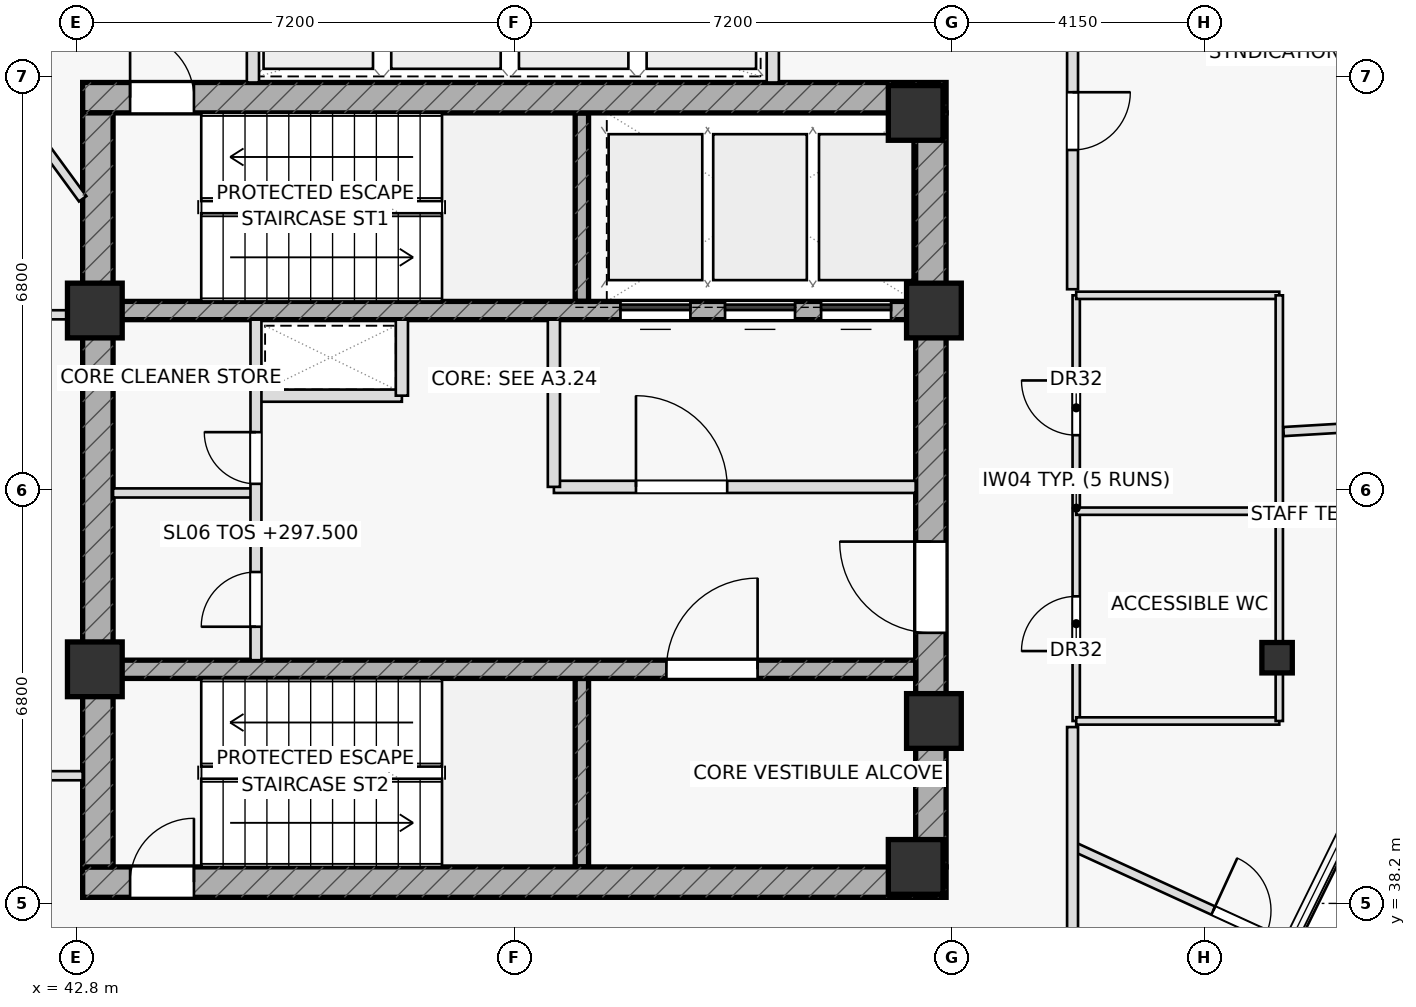
"""IFC4 building model, lengths in metres.
Left out: names, types, materials, properties, quantities, classifications, styles, units other than length and angle.
Written with IfcOpenShell. Run it as: python <this file> out.ifc"""

import sys

from ifc_helpers import new_model, si_unit, direction, frame, frame_2d, origin, origin_2d, place, context, subcontext, project, spatial, rectangle, hollow_rectangle, extrude, element, fill, save


model = new_model("IFC4")
c1 = context("Model", 3, precision=1e-05, world=origin(), true_north=direction((0.0, 1.0)))
c2 = subcontext(c1, "Body", "Model", "MODEL_VIEW")
j1 = project(units=[si_unit("LENGTHUNIT", "METRE"), si_unit("PLANEANGLEUNIT", "RADIAN")], contexts=[c1])
p1 = place(None, origin())
s1 = spatial("IfcSite", under=j1, at=p1, CompositionType="ELEMENT")
p2 = place(p1, origin())
s2 = spatial("IfcBuilding", under=s1, at=p2, CompositionType="ELEMENT")
p3 = place(p2, frame((0.0, 0.0, 297.5)))
s3 = spatial("IfcBuildingStorey", under=s2, at=p3, CompositionType="ELEMENT", Elevation=297.5)
for number, where, z_axis, x_axis in (
    (1, (51.11, 48.1, 0.0), (0.0, 0.0, 1.0), (0.0, 1.0, 0.0)),
    (2, (51.11, 38.8, 0.0), (0.0, 0.0, 1.0), (0.0, 1.0, 0.0)),
):
    element("IfcWall", number, at=place(p3, frame(where, z_axis=z_axis, x_axis=x_axis)), inside=s3, PredefinedType="SHEAR", context=c2, shape_type="SweptSolid", body=[
        extrude(rectangle(XDim=3.1, YDim=0.22, at=frame_2d((1.55, 0.0))), origin(), (0.0, 0.0, 1.0), 3.7),
    ])
p4 = place(p3, frame((42.9, 51.45, 0.0), z_axis=(0.0, 0.0, 1.0), x_axis=(1.0, 0.0, 0.0)))
e3 = element("IfcWall", 3, at=p4, inside=s3, PredefinedType="SHEAR", context=c2, shape_type="SweptSolid", body=[
    extrude(rectangle(XDim=14.2, YDim=0.5, at=frame_2d((7.1, 0.0))), origin(), (0.0, 0.0, 1.0), 3.7),
])
p5 = place(p4, frame((0.78, 0.0, 0.0)))
e4 = element("IfcOpeningElement", 4, at=p5, cuts=e3, PredefinedType="OPENING", context=c2, shape_type="SweptSolid", body=[
    extrude(rectangle(XDim=1.05, YDim=2.2, at=frame_2d((0.525, 1.1))), frame((0.0, 0.26, 0.0), z_axis=(0.0, -1.0, 0.0), x_axis=(1.0, 0.0, 0.0)), (0.0, 0.0, 1.0), 0.52),
])
p6 = place(p3, frame((42.9, 38.55, 0.0), z_axis=(0.0, 0.0, 1.0), x_axis=(1.0, 0.0, 0.0)))
e5 = element("IfcWall", 5, at=p6, inside=s3, PredefinedType="SHEAR", context=c2, shape_type="SweptSolid", body=[
    extrude(rectangle(XDim=14.2, YDim=0.5, at=frame_2d((7.1, 0.0))), origin(), (0.0, 0.0, 1.0), 3.7),
])
p7 = place(p6, frame((0.78, 0.0, 0.0)))
e6 = element("IfcOpeningElement", 6, at=p7, cuts=e5, PredefinedType="OPENING", context=c2, shape_type="SweptSolid", body=[
    extrude(rectangle(XDim=1.05, YDim=2.2, at=frame_2d((0.525, 1.1))), frame((0.0, 0.26, 0.0), z_axis=(0.0, -1.0, 0.0), x_axis=(1.0, 0.0, 0.0)), (0.0, 0.0, 1.0), 0.52),
])
p8 = place(p3, frame((43.15, 38.8, 0.0), z_axis=(0.0, 0.0, 1.0), x_axis=(0.0, 1.0, 0.0)))
e7 = element("IfcWall", 7, at=p8, inside=s3, PredefinedType="SHEAR", context=c2, shape_type="SweptSolid", body=[
    extrude(rectangle(XDim=12.4, YDim=0.5, at=frame_2d((6.2, 0.0))), origin(), (0.0, 0.0, 1.0), 3.7),
])
p9 = place(p3, frame((56.85, 38.8, 0.0), z_axis=(0.0, 0.0, 1.0), x_axis=(0.0, 1.0, 0.0)))
e8 = element("IfcWall", 8, at=p9, inside=s3, PredefinedType="SHEAR", context=c2, shape_type="SweptSolid", body=[
    extrude(rectangle(XDim=12.4, YDim=0.5, at=frame_2d((6.2, 0.0))), origin(), (0.0, 0.0, 1.0), 3.7),
])
p10 = place(p9, frame((3.85, 0.0, 0.0)))
e9 = element("IfcOpeningElement", 9, at=p10, cuts=e8, PredefinedType="OPENING", context=c2, shape_type="SweptSolid", body=[
    extrude(rectangle(XDim=1.5, YDim=2.2, at=frame_2d((0.75, 1.1))), frame((0.0, 0.26, 0.0), z_axis=(0.0, -1.0, 0.0), x_axis=(1.0, 0.0, 0.0)), (0.0, 0.0, 1.0), 0.52),
])
p11 = place(p3, frame((43.4, 47.95, 0.0), z_axis=(0.0, 0.0, 1.0), x_axis=(1.0, 0.0, 0.0)))
e10 = element("IfcWall", 10, at=p11, inside=s3, PredefinedType="SHEAR", context=c2, shape_type="SweptSolid", body=[
    extrude(rectangle(XDim=13.2, YDim=0.3, at=frame_2d((6.6, 0.0))), origin(), (0.0, 0.0, 1.0), 3.7),
])
p12 = place(p11, frame((8.345, 0.0, 0.0)))
e11 = element("IfcOpeningElement", 11, at=p12, cuts=e10, PredefinedType="OPENING", context=c2, shape_type="SweptSolid", body=[
    extrude(rectangle(XDim=1.15, YDim=2.2, at=frame_2d((0.575, 1.1))), frame((0.0, 0.16, 0.0), z_axis=(0.0, -1.0, 0.0), x_axis=(1.0, 0.0, 0.0)), (0.0, 0.0, 1.0), 0.32),
])
p13 = place(p11, frame((10.065, 0.0, 0.0)))
e12 = element("IfcOpeningElement", 12, at=p13, cuts=e10, PredefinedType="OPENING", context=c2, shape_type="SweptSolid", body=[
    extrude(rectangle(XDim=1.15, YDim=2.2, at=frame_2d((0.575, 1.1))), frame((0.0, 0.16, 0.0), z_axis=(0.0, -1.0, 0.0), x_axis=(1.0, 0.0, 0.0)), (0.0, 0.0, 1.0), 0.32),
])
p14 = place(p11, frame((11.645, 0.0, 0.0)))
e13 = element("IfcOpeningElement", 13, at=p14, cuts=e10, PredefinedType="OPENING", context=c2, shape_type="SweptSolid", body=[
    extrude(rectangle(XDim=1.15, YDim=2.2, at=frame_2d((0.575, 1.1))), frame((0.0, 0.16, 0.0), z_axis=(0.0, -1.0, 0.0), x_axis=(1.0, 0.0, 0.0)), (0.0, 0.0, 1.0), 0.32),
])
p15 = place(p3, frame((43.4, 42.05, 0.0), z_axis=(0.0, 0.0, 1.0), x_axis=(1.0, 0.0, 0.0)))
e14 = element("IfcWall", 14, at=p15, inside=s3, PredefinedType="SHEAR", context=c2, shape_type="SweptSolid", body=[
    extrude(rectangle(XDim=13.2, YDim=0.3, at=frame_2d((6.6, 0.0))), origin(), (0.0, 0.0, 1.0), 3.7),
])
p16 = place(p15, frame((9.1, 0.0, 0.0)))
e15 = element("IfcOpeningElement", 15, at=p16, cuts=e14, PredefinedType="OPENING", context=c2, shape_type="SweptSolid", body=[
    extrude(rectangle(XDim=1.5, YDim=2.2, at=frame_2d((0.75, 1.1))), frame((0.0, 0.16, 0.0), z_axis=(0.0, -1.0, 0.0), x_axis=(1.0, 0.0, 0.0)), (0.0, 0.0, 1.0), 0.32),
])
for number, where, z_axis, x_axis in (
    (16, (43.1, 47.95, 0.0), (0.0, 0.0, 1.0), (1.0, 0.0, 0.0)),
    (17, (56.9, 47.95, 0.0), (0.0, 0.0, 1.0), (1.0, 0.0, 0.0)),
    (18, (56.6, 51.2, 0.0), (0.0, 0.0, 1.0), (1.0, 0.0, 0.0)),
    (19, (43.1, 42.05, 0.0), (0.0, 0.0, 1.0), (1.0, 0.0, 0.0)),
    (20, (56.9, 41.2, 0.0), (0.0, 0.0, 1.0), (1.0, 0.0, 0.0)),
    (21, (56.6, 38.8, 0.0), (0.0, 0.0, 1.0), (1.0, 0.0, 0.0)),
):
    element("IfcColumn", number, at=place(p3, frame(where, z_axis=z_axis, x_axis=x_axis)), inside=s3, PredefinedType="COLUMN", context=c2, shape_type="SweptSolid", body=[
        extrude(rectangle(XDim=0.9, YDim=0.9, at=origin_2d()), origin(), (0.0, 0.0, 1.0), 3.7),
    ])
p17 = place(p3, frame((62.544, 42.24, 0.0), z_axis=(0.0, 0.0, 1.0), x_axis=(1.0, 0.0, 0.0)))
e22 = element("IfcColumn", 22, at=p17, inside=s3, PredefinedType="COLUMN", context=c2, shape_type="SweptSolid", body=[
    extrude(hollow_rectangle(XDim=0.5, YDim=0.5, WallThickness=0.03, at=origin_2d()), origin(), (0.0, 0.0, 1.0), 3.7),
])
for number, where, z_axis, x_axis in (
    (23, (45.7, 51.7, 0.0), (0.0, 0.0, 1.0), (0.0, 1.0, 0.0)),
    (24, (54.25, 51.7, 0.0), (0.0, 0.0, 1.0), (0.0, 1.0, 0.0)),
):
    element("IfcWall", number, at=place(p3, frame(where, z_axis=z_axis, x_axis=x_axis)), inside=s3, PredefinedType="PARTITIONING", context=c2, shape_type="SweptSolid", body=[
        extrude(rectangle(XDim=2.6, YDim=0.2, at=frame_2d((1.3, 0.0))), origin(), (0.0, 0.0, 1.0), 3.7),
    ])
p18 = place(p3, frame((45.75, 46.55, 0.0), z_axis=(0.0, 0.0, 1.0), x_axis=(1.0, 0.0, 0.0)))
e25 = element("IfcWall", 25, at=p18, inside=s3, PredefinedType="PARTITIONING", context=c2, shape_type="SweptSolid", body=[
    extrude(rectangle(XDim=2.4, YDim=0.2, at=frame_2d((1.2, 0.0))), origin(), (0.0, 0.0, 1.0), 3.7),
])
p19 = place(p3, frame((48.15, 46.55, 0.0), z_axis=(0.0, 0.0, 1.0), x_axis=(0.0, 1.0, 0.0)))
e26 = element("IfcWall", 26, at=p19, inside=s3, PredefinedType="PARTITIONING", context=c2, shape_type="SweptSolid", body=[
    extrude(rectangle(XDim=1.25, YDim=0.2, at=frame_2d((0.625, 0.0))), origin(), (0.0, 0.0, 1.0), 3.7),
])
p20 = place(p3, frame((50.65, 45.05, 0.0), z_axis=(0.0, 0.0, 1.0), x_axis=(1.0, 0.0, 0.0)))
e27 = element("IfcWall", 27, at=p20, inside=s3, PredefinedType="PARTITIONING", context=c2, shape_type="SweptSolid", body=[
    extrude(rectangle(XDim=5.95, YDim=0.2, at=frame_2d((2.975, 0.0))), origin(), (0.0, 0.0, 1.0), 3.7),
])
p21 = place(p20, frame((1.35, 0.0, 0.0)))
e28 = element("IfcOpeningElement", 28, at=p21, cuts=e27, PredefinedType="OPENING", context=c2, shape_type="SweptSolid", body=[
    extrude(rectangle(XDim=1.5, YDim=2.2, at=frame_2d((0.75, 1.1))), frame((0.0, 0.11, 0.0), z_axis=(0.0, -1.0, 0.0), x_axis=(1.0, 0.0, 0.0)), (0.0, 0.0, 1.0), 0.22),
])
p22 = place(p3, frame((50.65, 45.05, 0.0), z_axis=(0.0, 0.0, 1.0), x_axis=(0.0, 1.0, 0.0)))
e29 = element("IfcWall", 29, at=p22, inside=s3, PredefinedType="PARTITIONING", context=c2, shape_type="SweptSolid", body=[
    extrude(rectangle(XDim=2.75, YDim=0.2, at=frame_2d((1.375, 0.0))), origin(), (0.0, 0.0, 1.0), 3.7),
])
p23 = place(p3, frame((43.4, 44.95, 0.0), z_axis=(0.0, 0.0, 1.0), x_axis=(1.0, 0.0, 0.0)))
e30 = element("IfcWall", 30, at=p23, inside=s3, PredefinedType="PARTITIONING", context=c2, shape_type="SweptSolid", body=[
    extrude(rectangle(XDim=2.35, YDim=0.15, at=frame_2d((1.175, 0.0))), origin(), (0.0, 0.0, 1.0), 3.7),
])
p24 = place(p3, frame((45.75, 42.2, 0.0), z_axis=(0.0, 0.0, 1.0), x_axis=(0.0, 1.0, 0.0)))
e31 = element("IfcWall", 31, at=p24, inside=s3, PredefinedType="PARTITIONING", context=c2, shape_type="SweptSolid", body=[
    extrude(rectangle(XDim=5.6, YDim=0.18, at=frame_2d((2.8, 0.0))), origin(), (0.0, 0.0, 1.0), 3.7),
])
p25 = place(p24, frame((0.55, 0.0, 0.0)))
e32 = element("IfcOpeningElement", 32, at=p25, cuts=e31, PredefinedType="OPENING", context=c2, shape_type="SweptSolid", body=[
    extrude(rectangle(XDim=0.9, YDim=2.05, at=frame_2d((0.45, 1.025))), frame((0.0, 0.1, 0.0), z_axis=(0.0, -1.0, 0.0), x_axis=(1.0, 0.0, 0.0)), (0.0, 0.0, 1.0), 0.2),
])
p26 = place(p24, frame((2.9, 0.0, 0.0)))
e33 = element("IfcOpeningElement", 33, at=p26, cuts=e31, PredefinedType="OPENING", context=c2, shape_type="SweptSolid", body=[
    extrude(rectangle(XDim=0.85, YDim=2.05, at=frame_2d((0.425, 1.025))), frame((0.0, 0.1, 0.0), z_axis=(0.0, -1.0, 0.0), x_axis=(1.0, 0.0, 0.0)), (0.0, 0.0, 1.0), 0.2),
])
p27 = place(p3, frame((37.14, 40.3, 0.0), z_axis=(0.0, 0.0, 1.0), x_axis=(1.0, 0.0, 0.0)))
e34 = element("IfcWall", 34, at=p27, inside=s3, PredefinedType="PARTITIONING", context=c2, shape_type="SweptSolid", body=[
    extrude(rectangle(XDim=5.76, YDim=0.15, at=frame_2d((2.88, 0.0))), origin(), (0.0, 0.0, 1.0), 3.175),
])
p28 = place(p27, frame((3.21, 0.0, 0.0)))
e35 = element("IfcOpeningElement", 35, at=p28, cuts=e34, PredefinedType="OPENING", context=c2, shape_type="SweptSolid", body=[
    extrude(rectangle(XDim=0.95, YDim=2.05, at=frame_2d((0.475, 1.025))), frame((0.0, 0.085, 0.0), z_axis=(0.0, -1.0, 0.0), x_axis=(1.0, 0.0, 0.0)), (0.0, 0.0, 1.0), 0.17),
])
p29 = place(p3, frame((37.14, 47.88, 0.0), z_axis=(0.0, 0.0, 1.0), x_axis=(1.0, 0.0, 0.0)))
e36 = element("IfcWall", 36, at=p29, inside=s3, PredefinedType="PARTITIONING", context=c2, shape_type="SweptSolid", body=[
    extrude(rectangle(XDim=5.76, YDim=0.15, at=frame_2d((2.88, 0.0))), origin(), (0.0, 0.0, 1.0), 3.7),
])
p30 = place(p3, frame((59.24, 41.2, 0.0), z_axis=(0.0, 0.0, 1.0), x_axis=(0.0, 1.0, 0.0)))
e37 = element("IfcWall", 37, at=p30, inside=s3, PredefinedType="PARTITIONING", context=c2, shape_type="SweptSolid", body=[
    extrude(rectangle(XDim=7.0, YDim=0.12, at=frame_2d((3.5, 0.0))), origin(), (0.0, 0.0, 1.0), 3.7),
])
p31 = place(p30, frame((1.15, 0.0, 0.0)))
e38 = element("IfcOpeningElement", 38, at=p31, cuts=e37, PredefinedType="OPENING", context=c2, shape_type="SweptSolid", body=[
    extrude(rectangle(XDim=0.9, YDim=2.05, at=frame_2d((0.45, 1.025))), frame((0.0, 0.07, 0.0), z_axis=(0.0, -1.0, 0.0), x_axis=(1.0, 0.0, 0.0)), (0.0, 0.0, 1.0), 0.14),
])
p32 = place(p30, frame((4.7, 0.0, 0.0)))
e39 = element("IfcOpeningElement", 39, at=p32, cuts=e37, PredefinedType="OPENING", context=c2, shape_type="SweptSolid", body=[
    extrude(rectangle(XDim=0.9, YDim=2.05, at=frame_2d((0.45, 1.025))), frame((0.0, 0.07, 0.0), z_axis=(0.0, -1.0, 0.0), x_axis=(1.0, 0.0, 0.0)), (0.0, 0.0, 1.0), 0.14),
])
p33 = place(p3, frame((59.24, 41.2, 0.0), z_axis=(0.0, 0.0, 1.0), x_axis=(1.0, 0.0, 0.0)))
e40 = element("IfcWall", 40, at=p33, inside=s3, PredefinedType="PARTITIONING", context=c2, shape_type="SweptSolid", body=[
    extrude(rectangle(XDim=3.34, YDim=0.12, at=frame_2d((1.67, 0.0))), origin(), (0.0, 0.0, 1.0), 3.175),
])
for number, where, z_axis, x_axis in (
    (41, (59.24, 44.65, 0.0), (0.0, 0.0, 1.0), (1.0, 0.0, 0.0)),
    (42, (59.24, 48.2, 0.0), (0.0, 0.0, 1.0), (1.0, 0.0, 0.0)),
):
    element("IfcWall", number, at=place(p3, frame(where, z_axis=z_axis, x_axis=x_axis)), inside=s3, PredefinedType="PARTITIONING", context=c2, shape_type="SweptSolid", body=[
        extrude(rectangle(XDim=3.34, YDim=0.12, at=frame_2d((1.67, 0.0))), origin(), (0.0, 0.0, 1.0), 3.7),
    ])
p34 = place(p3, frame((62.58, 41.2, 0.0), z_axis=(0.0, 0.0, 1.0), x_axis=(0.0, 1.0, 0.0)))
e43 = element("IfcWall", 43, at=p34, inside=s3, PredefinedType="PARTITIONING", context=c2, shape_type="SweptSolid", body=[
    extrude(rectangle(XDim=7.0, YDim=0.12, at=frame_2d((3.5, 0.0))), origin(), (0.0, 0.0, 1.0), 3.235),
])
p35 = place(p3, frame((59.18, 39.143, 0.0), z_axis=(0.0, 0.0, 1.0), x_axis=(0.909076630741, -0.416628946955, 0.0)))
e44 = element("IfcWall", 44, at=p35, inside=s3, PredefinedType="PARTITIONING", context=c2, shape_type="SweptSolid", body=[
    extrude(rectangle(XDim=3.916, YDim=0.15, at=frame_2d((1.958, 0.0))), origin(), (0.0, 0.0, 1.0), 3.235),
])
p36 = place(p35, frame((2.545, 0.0, 0.0)))
e45 = element("IfcOpeningElement", 45, at=p36, cuts=e44, PredefinedType="OPENING", context=c2, shape_type="SweptSolid", body=[
    extrude(rectangle(XDim=0.95, YDim=2.05, at=frame_2d((0.475, 1.025))), frame((0.0, 0.085, 0.0), z_axis=(0.0, -1.0, 0.0), x_axis=(1.0, 0.0, 0.0)), (0.0, 0.0, 1.0), 0.17),
])
p37 = place(p3, frame((62.65, 45.959, 0.0), z_axis=(0.0, 0.0, 1.0), x_axis=(0.998263156223, 0.058912400462, 0.0)))
e46 = element("IfcWall", 46, at=p37, inside=s3, PredefinedType="PARTITIONING", context=c2, shape_type="SweptSolid", body=[
    extrude(rectangle(XDim=3.759, YDim=0.15, at=frame_2d((1.879, 0.0))), origin(), (0.0, 0.0, 1.0), 3.235),
])
p38 = place(p3, frame((42.9, 49.787, 0.0), z_axis=(0.0, 0.0, 1.0), x_axis=(-0.590195506102, 0.80726034498, 0.0)))
e47 = element("IfcWall", 47, at=p38, inside=s3, PredefinedType="PARTITIONING", context=c2, shape_type="SweptSolid", body=[
    extrude(rectangle(XDim=14.813, YDim=0.15, at=frame_2d((7.406, 0.0))), origin(), (0.0, 0.0, 1.0), 3.175),
])
p39 = place(p38, frame((1.35, 0.0, 0.0)))
e48 = element("IfcOpeningElement", 48, at=p39, cuts=e47, PredefinedType="OPENING", context=c2, shape_type="SweptSolid", body=[
    extrude(rectangle(XDim=0.95, YDim=2.05, at=frame_2d((0.475, 1.025))), frame((0.0, 0.085, 0.0), z_axis=(0.0, -1.0, 0.0), x_axis=(1.0, 0.0, 0.0)), (0.0, 0.0, 1.0), 0.17),
])
p40 = place(p3, frame((59.18, 53.83, 0.0), z_axis=(0.0, 0.0, 1.0), x_axis=(0.0, -1.0, 0.0)))
e49 = element("IfcWall", 49, at=p40, inside=s3, PredefinedType="PARTITIONING", context=c2, shape_type="SweptSolid", body=[
    extrude(rectangle(XDim=5.53, YDim=0.18, at=frame_2d((2.765, 0.0))), origin(), (0.0, 0.0, 1.0), 3.7),
])
p41 = place(p40, frame((2.29, 0.0, 0.0)))
e50 = element("IfcOpeningElement", 50, at=p41, cuts=e49, PredefinedType="OPENING", context=c2, shape_type="SweptSolid", body=[
    extrude(rectangle(XDim=0.95, YDim=2.05, at=frame_2d((0.475, 1.025))), frame((0.0, 0.1, 0.0), z_axis=(0.0, -1.0, 0.0), x_axis=(1.0, 0.0, 0.0)), (0.0, 0.0, 1.0), 0.2),
])
p42 = place(p3, frame((59.18, 41.1, 0.0), z_axis=(0.0, 0.0, 1.0), x_axis=(0.0, -1.0, 0.0)))
e51 = element("IfcWall", 51, at=p42, inside=s3, PredefinedType="PARTITIONING", context=c2, shape_type="SweptSolid", body=[
    extrude(rectangle(XDim=4.93, YDim=0.18, at=frame_2d((2.465, 0.0))), origin(), (0.0, 0.0, 1.0), 3.435),
])
p43 = place(p5, origin())
e52 = element("IfcDoor", 52, at=p43, inside=s3, OperationType="SINGLE_SWING_LEFT", PredefinedType="DOOR", context=c2, shape_type="SweptSolid", body=[
    extrude(rectangle(XDim=1.05, YDim=2.2, at=frame_2d((0.525, 1.1))), frame((0.0, 0.025, 0.0), z_axis=(0.0, -1.0, 0.0), x_axis=(1.0, 0.0, 0.0)), (0.0, 0.0, 1.0), 0.05),
])
fill(e4, e52)
p44 = place(p7, origin())
e53 = element("IfcDoor", 53, at=p44, inside=s3, OperationType="SINGLE_SWING_RIGHT", PredefinedType="DOOR", context=c2, shape_type="SweptSolid", body=[
    extrude(rectangle(XDim=1.05, YDim=2.2, at=frame_2d((0.525, 1.1))), frame((0.0, 0.025, 0.0), z_axis=(0.0, -1.0, 0.0), x_axis=(1.0, 0.0, 0.0)), (0.0, 0.0, 1.0), 0.05),
])
fill(e6, e53)
p45 = place(p10, origin())
e54 = element("IfcDoor", 54, at=p45, inside=s3, OperationType="SINGLE_SWING_RIGHT", PredefinedType="DOOR", context=c2, shape_type="SweptSolid", body=[
    extrude(rectangle(XDim=1.5, YDim=2.2, at=frame_2d((0.75, 1.1))), frame((0.0, 0.025, 0.0), z_axis=(0.0, -1.0, 0.0), x_axis=(1.0, 0.0, 0.0)), (0.0, 0.0, 1.0), 0.05),
])
fill(e9, e54)
p46 = place(p21, origin())
e55 = element("IfcDoor", 55, at=p46, inside=s3, OperationType="SINGLE_SWING_LEFT", PredefinedType="DOOR", context=c2, shape_type="SweptSolid", body=[
    extrude(rectangle(XDim=1.5, YDim=2.2, at=frame_2d((0.75, 1.1))), frame((0.0, 0.025, 0.0), z_axis=(0.0, -1.0, 0.0), x_axis=(1.0, 0.0, 0.0)), (0.0, 0.0, 1.0), 0.05),
])
fill(e28, e55)
p47 = place(p16, origin())
e56 = element("IfcDoor", 56, at=p47, inside=s3, OperationType="SINGLE_SWING_RIGHT", PredefinedType="DOOR", context=c2, shape_type="SweptSolid", body=[
    extrude(rectangle(XDim=1.5, YDim=2.2, at=frame_2d((0.75, 1.1))), frame((0.0, 0.025, 0.0), z_axis=(0.0, -1.0, 0.0), x_axis=(1.0, 0.0, 0.0)), (0.0, 0.0, 1.0), 0.05),
])
fill(e15, e56)
p48 = place(p25, origin())
e57 = element("IfcDoor", 57, at=p48, inside=s3, OperationType="SINGLE_SWING_LEFT", PredefinedType="DOOR", context=c2, shape_type="SweptSolid", body=[
    extrude(rectangle(XDim=0.9, YDim=2.05, at=frame_2d((0.45, 1.025))), frame((0.0, 0.025, 0.0), z_axis=(0.0, -1.0, 0.0), x_axis=(1.0, 0.0, 0.0)), (0.0, 0.0, 1.0), 0.05),
])
fill(e32, e57)
p49 = place(p26, origin())
e58 = element("IfcDoor", 58, at=p49, inside=s3, OperationType="SINGLE_SWING_RIGHT", PredefinedType="DOOR", context=c2, shape_type="SweptSolid", body=[
    extrude(rectangle(XDim=0.85, YDim=2.05, at=frame_2d((0.425, 1.025))), frame((0.0, 0.025, 0.0), z_axis=(0.0, -1.0, 0.0), x_axis=(1.0, 0.0, 0.0)), (0.0, 0.0, 1.0), 0.05),
])
fill(e33, e58)
p50 = place(p31, origin())
e59 = element("IfcDoor", 59, at=p50, inside=s3, OperationType="SINGLE_SWING_LEFT", PredefinedType="DOOR", context=c2, shape_type="SweptSolid", body=[
    extrude(rectangle(XDim=0.9, YDim=2.05, at=frame_2d((0.45, 1.025))), frame((0.0, 0.025, 0.0), z_axis=(0.0, -1.0, 0.0), x_axis=(1.0, 0.0, 0.0)), (0.0, 0.0, 1.0), 0.05),
])
fill(e38, e59)
p51 = place(p32, origin())
e60 = element("IfcDoor", 60, at=p51, inside=s3, OperationType="SINGLE_SWING_RIGHT", PredefinedType="DOOR", context=c2, shape_type="SweptSolid", body=[
    extrude(rectangle(XDim=0.9, YDim=2.05, at=frame_2d((0.45, 1.025))), frame((0.0, 0.025, 0.0), z_axis=(0.0, -1.0, 0.0), x_axis=(1.0, 0.0, 0.0)), (0.0, 0.0, 1.0), 0.05),
])
fill(e39, e60)
p52 = place(p36, origin())
e61 = element("IfcDoor", 61, at=p52, inside=s3, OperationType="SINGLE_SWING_LEFT", PredefinedType="DOOR", context=c2, shape_type="SweptSolid", body=[
    extrude(rectangle(XDim=0.95, YDim=2.05, at=frame_2d((0.475, 1.025))), frame((0.0, 0.025, 0.0), z_axis=(0.0, -1.0, 0.0), x_axis=(1.0, 0.0, 0.0)), (0.0, 0.0, 1.0), 0.05),
])
fill(e45, e61)
p53 = place(p41, origin())
e62 = element("IfcDoor", 62, at=p53, inside=s3, OperationType="SINGLE_SWING_LEFT", PredefinedType="DOOR", context=c2, shape_type="SweptSolid", body=[
    extrude(rectangle(XDim=0.95, YDim=2.05, at=frame_2d((0.475, 1.025))), frame((0.0, 0.025, 0.0), z_axis=(0.0, -1.0, 0.0), x_axis=(1.0, 0.0, 0.0)), (0.0, 0.0, 1.0), 0.05),
])
fill(e50, e62)
p54 = place(p12, origin())
e63 = element("IfcDoor", 63, at=p54, inside=s3, OperationType="SLIDING_TO_LEFT", PredefinedType="DOOR", context=c2, shape_type="SweptSolid", body=[
    extrude(rectangle(XDim=1.15, YDim=2.2, at=frame_2d((0.575, 1.1))), frame((0.0, 0.025, 0.0), z_axis=(0.0, -1.0, 0.0), x_axis=(1.0, 0.0, 0.0)), (0.0, 0.0, 1.0), 0.05),
])
fill(e11, e63)
p55 = place(p13, origin())
e64 = element("IfcDoor", 64, at=p55, inside=s3, OperationType="SLIDING_TO_LEFT", PredefinedType="DOOR", context=c2, shape_type="SweptSolid", body=[
    extrude(rectangle(XDim=1.15, YDim=2.2, at=frame_2d((0.575, 1.1))), frame((0.0, 0.025, 0.0), z_axis=(0.0, -1.0, 0.0), x_axis=(1.0, 0.0, 0.0)), (0.0, 0.0, 1.0), 0.05),
])
fill(e12, e64)
p56 = place(p14, origin())
e65 = element("IfcDoor", 65, at=p56, inside=s3, OperationType="SLIDING_TO_LEFT", PredefinedType="DOOR", context=c2, shape_type="SweptSolid", body=[
    extrude(rectangle(XDim=1.15, YDim=2.2, at=frame_2d((0.575, 1.1))), frame((0.0, 0.025, 0.0), z_axis=(0.0, -1.0, 0.0), x_axis=(1.0, 0.0, 0.0)), (0.0, 0.0, 1.0), 0.05),
])
fill(e13, e65)
save(model, sys.argv[1])
